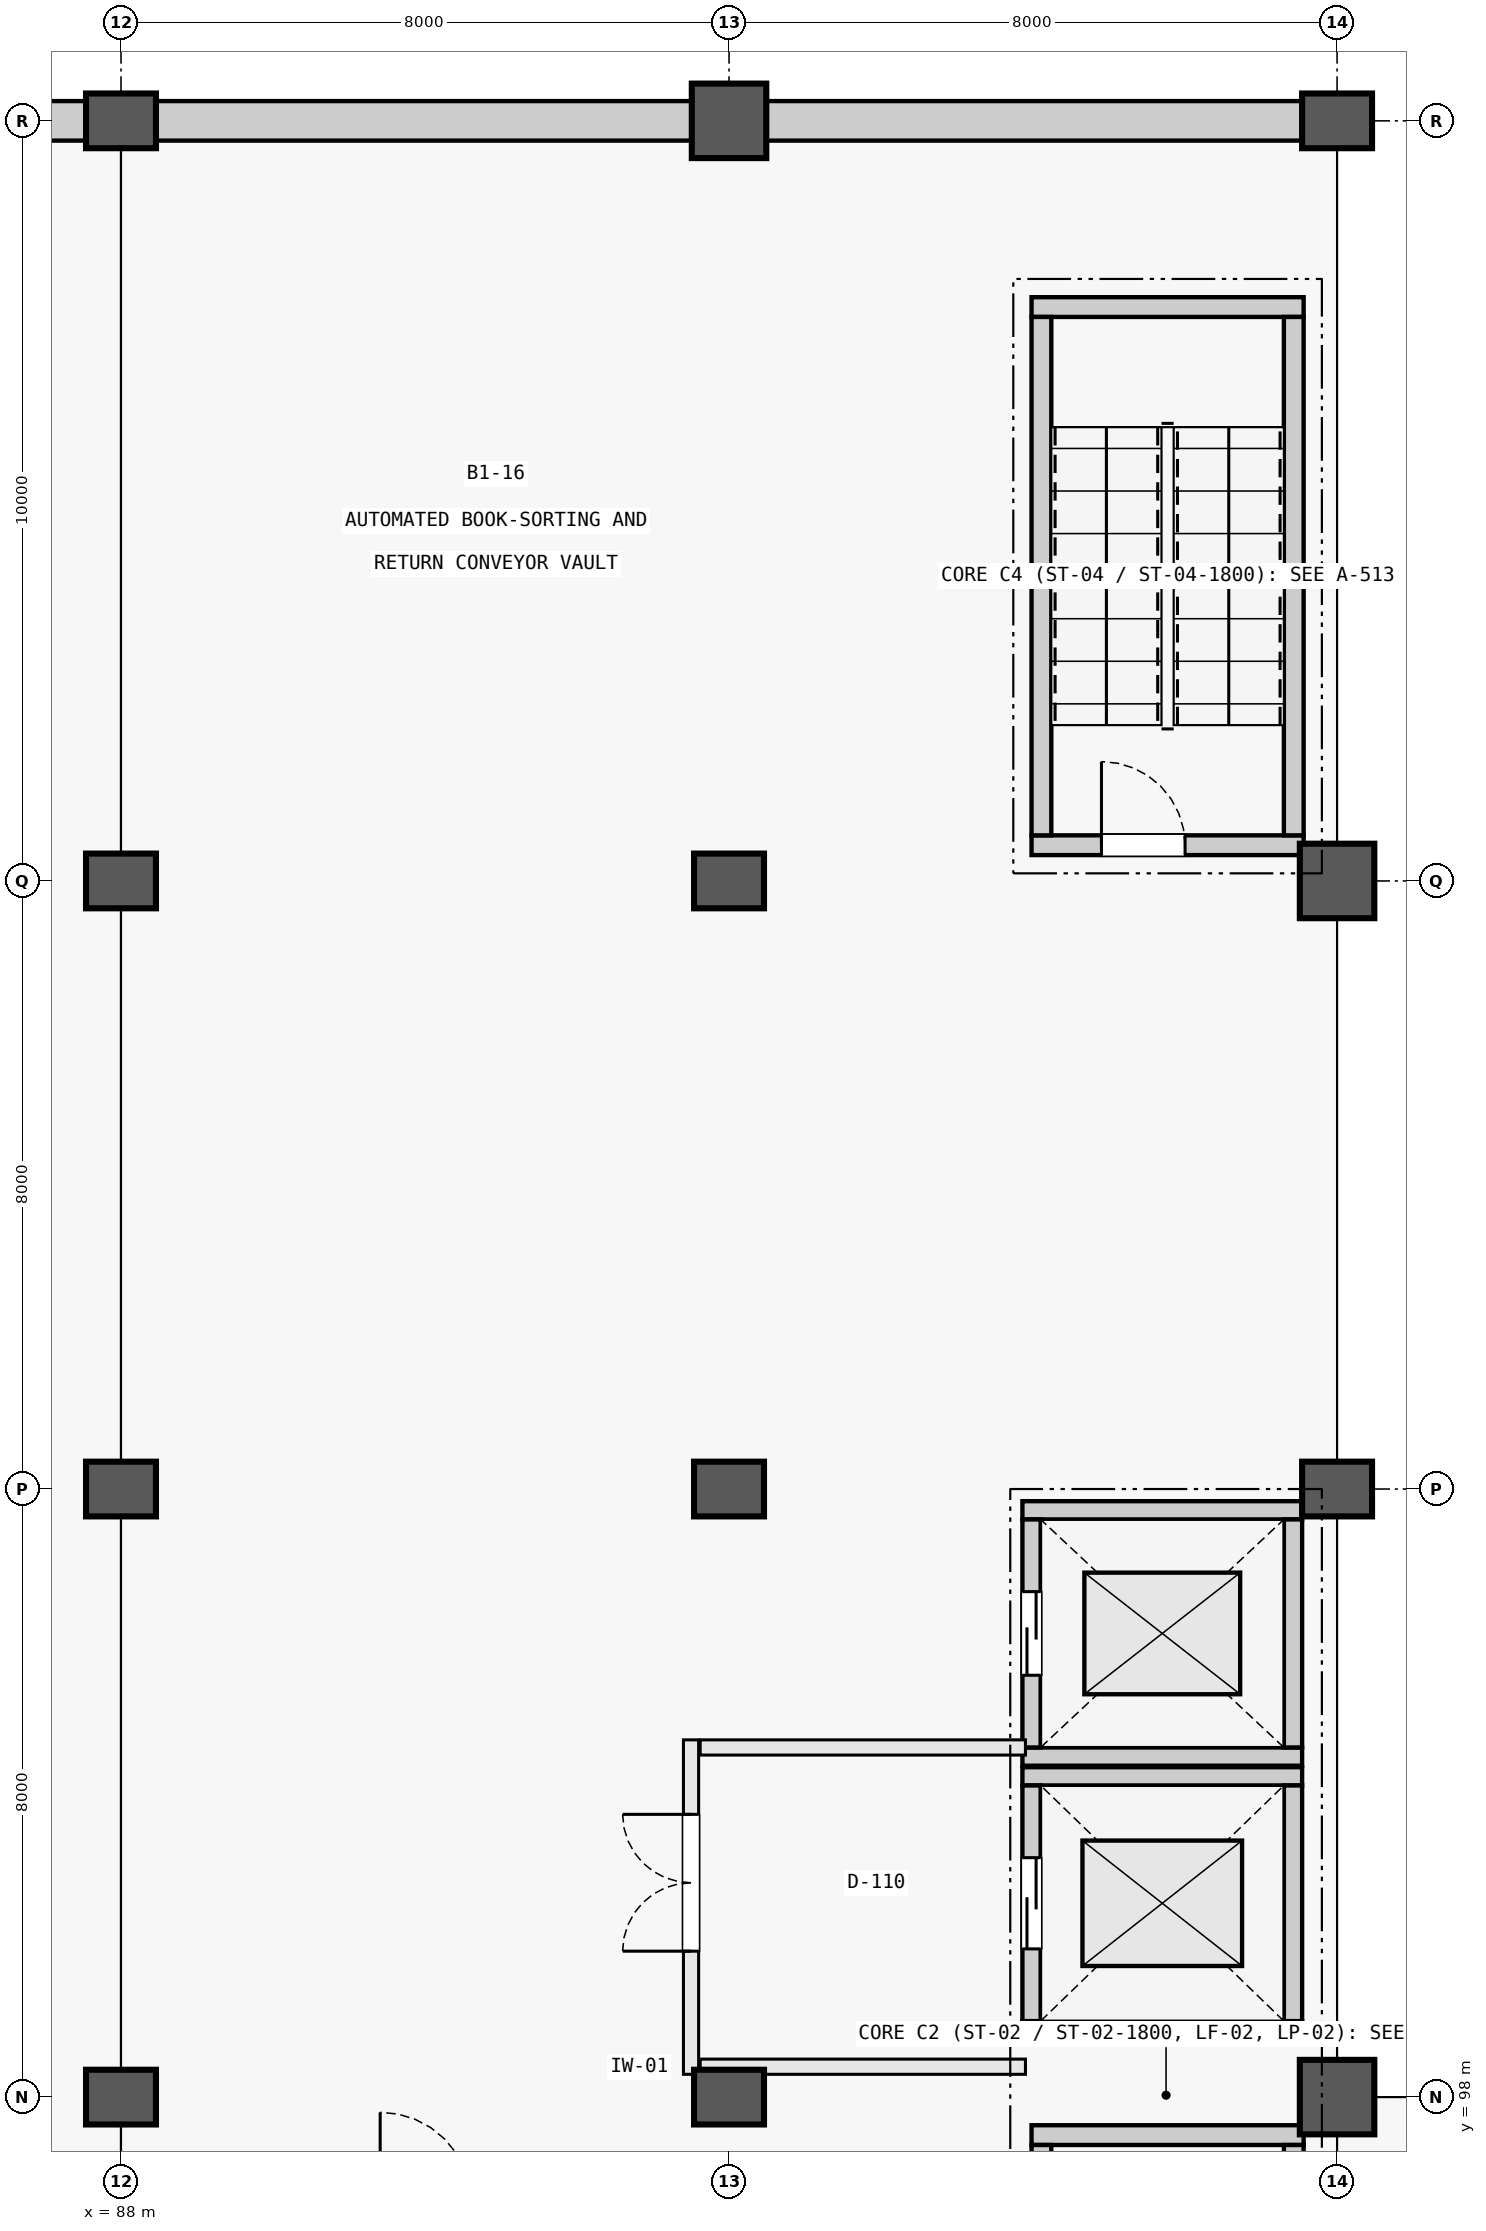
"""IFC4 building model, lengths in metres.
Left out: names, types, materials, properties, quantities, classifications, styles, units other than length and angle.
Written with IfcOpenShell. Run it as: python <this file> out.ifc"""

import sys

from ifc_helpers import new_model, si_unit, direction, frame, frame_2d, origin, origin_2d, place, context, subcontext, project, spatial, rectangle, extrude, element, fill, save


model = new_model("IFC4")
c1 = context("Model", 3, precision=1e-05, world=origin(), true_north=direction((0.0, 1.0)))
c2 = subcontext(c1, "Body", "Model", "MODEL_VIEW")
j1 = project(units=[si_unit("LENGTHUNIT", "METRE"), si_unit("PLANEANGLEUNIT", "RADIAN")], contexts=[c1])
p1 = place(None, origin())
s1 = spatial("IfcSite", under=j1, at=p1, CompositionType="ELEMENT")
p2 = place(p1, origin())
s2 = spatial("IfcBuilding", under=s1, at=p2, CompositionType="ELEMENT")
p3 = place(p2, frame((0.0, 0.0, -5.4)))
s3 = spatial("IfcBuildingStorey", under=s2, at=p3, CompositionType="ELEMENT", Elevation=-5.4)
for number, where, z_axis, x_axis in (
    (1, (88.0, 98.0, 0.0), (0.0, 0.0, 1.0), (1.0, 0.0, 0.0)),
    (2, (88.0, 106.0, 0.0), (0.0, 0.0, 1.0), (1.0, 0.0, 0.0)),
    (3, (88.0, 114.0, 0.0), (0.0, 0.0, 1.0), (1.0, 0.0, 0.0)),
    (4, (88.0, 124.0, 0.0), (0.0, 0.0, 1.0), (1.0, 0.0, 0.0)),
    (5, (96.0, 98.0, 0.0), (0.0, 0.0, 1.0), (1.0, 0.0, 0.0)),
    (6, (96.0, 106.0, 0.0), (0.0, 0.0, 1.0), (1.0, 0.0, 0.0)),
    (7, (96.0, 114.0, 0.0), (0.0, 0.0, 1.0), (1.0, 0.0, 0.0)),
):
    element("IfcColumn", number, at=place(p3, frame(where, z_axis=z_axis, x_axis=x_axis)), inside=s3, PredefinedType="COLUMN", context=c2, shape_type="SweptSolid", body=[
        extrude(rectangle(XDim=0.92, YDim=0.72, at=origin_2d()), origin(), (0.0, 0.0, 1.0), 5.4),
    ])
for number, where, z_axis, x_axis in (
    (8, (96.0, 124.0, 0.0), (0.0, 0.0, 1.0), (1.0, 0.0, 0.0)),
    (9, (104.0, 98.0, 0.0), (0.0, 0.0, 1.0), (1.0, 0.0, 0.0)),
):
    element("IfcColumn", number, at=place(p3, frame(where, z_axis=z_axis, x_axis=x_axis)), inside=s3, PredefinedType="COLUMN", context=c2, shape_type="SweptSolid", body=[
        extrude(rectangle(XDim=0.98, YDim=0.98, at=origin_2d()), origin(), (0.0, 0.0, 1.0), 5.4),
    ])
p4 = place(p3, frame((104.0, 106.0, 0.0), z_axis=(0.0, 0.0, 1.0), x_axis=(1.0, 0.0, 0.0)))
e10 = element("IfcColumn", 10, at=p4, inside=s3, PredefinedType="COLUMN", context=c2, shape_type="SweptSolid", body=[
    extrude(rectangle(XDim=0.92, YDim=0.72, at=origin_2d()), origin(), (0.0, 0.0, 1.0), 5.4),
])
p5 = place(p3, frame((104.0, 114.0, 0.0), z_axis=(0.0, 0.0, 1.0), x_axis=(1.0, 0.0, 0.0)))
e11 = element("IfcColumn", 11, at=p5, inside=s3, PredefinedType="COLUMN", context=c2, shape_type="SweptSolid", body=[
    extrude(rectangle(XDim=0.98, YDim=0.98, at=origin_2d()), origin(), (0.0, 0.0, 1.0), 5.4),
])
p6 = place(p3, frame((104.0, 124.0, 0.0), z_axis=(0.0, 0.0, 1.0), x_axis=(1.0, 0.0, 0.0)))
e12 = element("IfcColumn", 12, at=p6, inside=s3, PredefinedType="COLUMN", context=c2, shape_type="SweptSolid", body=[
    extrude(rectangle(XDim=0.92, YDim=0.72, at=origin_2d()), origin(), (0.0, 0.0, 1.0), 5.4),
])
for number, where, z_axis, x_axis in (
    (13, (80.49, 124.0, 0.0), (0.0, 0.0, 1.0), (1.0, 0.0, 0.0)),
    (14, (88.46, 124.0, 0.0), (0.0, 0.0, 1.0), (1.0, 0.0, 0.0)),
    (15, (96.49, 124.0, 0.0), (0.0, 0.0, 1.0), (1.0, 0.0, 0.0)),
):
    element("IfcWall", number, at=place(p3, frame(where, z_axis=z_axis, x_axis=x_axis)), inside=s3, PredefinedType="USERDEFINED", context=c2, shape_type="SweptSolid", body=[
        extrude(rectangle(XDim=7.05, YDim=0.52, at=frame_2d((3.525, 0.0))), origin(), (0.0, 0.0, 1.0), 4.98),
    ])
p7 = place(p3, frame((99.98, 97.5, 0.0), z_axis=(0.0, 0.0, 1.0), x_axis=(1.0, 0.0, 0.0)))
e16 = element("IfcWall", 16, at=p7, inside=s3, PredefinedType="SOLIDWALL", context=c2, shape_type="SweptSolid", body=[
    extrude(rectangle(XDim=3.58, YDim=0.26, at=frame_2d((1.79, 0.0))), origin(), (0.0, 0.0, 1.0), 5.4),
])
for number, where, z_axis, x_axis in (
    (17, (100.11, 90.55, 0.0), (0.0, 0.0, 1.0), (0.0, 1.0, 0.0)),
    (18, (103.43, 90.55, 0.0), (0.0, 0.0, 1.0), (0.0, 1.0, 0.0)),
):
    element("IfcWall", number, at=place(p3, frame(where, z_axis=z_axis, x_axis=x_axis)), inside=s3, PredefinedType="SOLIDWALL", context=c2, shape_type="SweptSolid", body=[
        extrude(rectangle(XDim=6.82, YDim=0.26, at=frame_2d((3.41, 0.0))), origin(), (0.0, 0.0, 1.0), 5.4),
    ])
p8 = place(p3, frame((99.98, 114.47, 0.0), z_axis=(0.0, 0.0, 1.0), x_axis=(1.0, 0.0, 0.0)))
e19 = element("IfcWall", 19, at=p8, inside=s3, PredefinedType="SOLIDWALL", context=c2, shape_type="SweptSolid", body=[
    extrude(rectangle(XDim=3.58, YDim=0.26, at=frame_2d((1.79, 0.0))), origin(), (0.0, 0.0, 1.0), 5.4),
])
p9 = place(p8, frame((0.92, 0.0, 0.0)))
e20 = element("IfcOpeningElement", 20, at=p9, cuts=e19, PredefinedType="OPENING", context=c2, shape_type="SweptSolid", body=[
    extrude(rectangle(XDim=1.1, YDim=2.2, at=frame_2d((0.55, 1.1))), frame((0.0, 0.142, 0.0), z_axis=(0.0, -1.0, 0.0), x_axis=(1.0, 0.0, 0.0)), (0.0, 0.0, 1.0), 0.284),
])
p10 = place(p3, frame((99.98, 121.55, 0.0), z_axis=(0.0, 0.0, 1.0), x_axis=(1.0, 0.0, 0.0)))
e21 = element("IfcWall", 21, at=p10, inside=s3, PredefinedType="SOLIDWALL", context=c2, shape_type="SweptSolid", body=[
    extrude(rectangle(XDim=3.58, YDim=0.26, at=frame_2d((1.79, 0.0))), origin(), (0.0, 0.0, 1.0), 5.4),
])
for number, where, z_axis, x_axis in (
    (22, (100.11, 114.6, 0.0), (0.0, 0.0, 1.0), (0.0, 1.0, 0.0)),
    (23, (103.43, 114.6, 0.0), (0.0, 0.0, 1.0), (0.0, 1.0, 0.0)),
):
    element("IfcWall", number, at=place(p3, frame(where, z_axis=z_axis, x_axis=x_axis)), inside=s3, PredefinedType="SOLIDWALL", context=c2, shape_type="SweptSolid", body=[
        extrude(rectangle(XDim=6.82, YDim=0.26, at=frame_2d((3.41, 0.0))), origin(), (0.0, 0.0, 1.0), 5.4),
    ])
for number, where, z_axis, x_axis in (
    (24, (99.86, 98.88, 0.0), (0.0, 0.0, 1.0), (1.0, 0.0, 0.0)),
    (25, (99.86, 102.22, 0.0), (0.0, 0.0, 1.0), (1.0, 0.0, 0.0)),
):
    element("IfcWall", number, at=place(p3, frame(where, z_axis=z_axis, x_axis=x_axis)), inside=s3, PredefinedType="SOLIDWALL", context=c2, shape_type="SweptSolid", body=[
        extrude(rectangle(XDim=3.68, YDim=0.24, at=frame_2d((1.84, 0.0))), origin(), (0.0, 0.0, 1.0), 5.4),
    ])
p11 = place(p3, frame((99.98, 99.0, 0.0), z_axis=(0.0, 0.0, 1.0), x_axis=(0.0, 1.0, 0.0)))
e26 = element("IfcWall", 26, at=p11, inside=s3, PredefinedType="SOLIDWALL", context=c2, shape_type="SweptSolid", body=[
    extrude(rectangle(XDim=3.1, YDim=0.24, at=frame_2d((1.55, 0.0))), origin(), (0.0, 0.0, 1.0), 5.4),
])
p12 = place(p11, frame((0.95, 0.0, 0.0)))
e27 = element("IfcOpeningElement", 27, at=p12, cuts=e26, PredefinedType="OPENING", context=c2, shape_type="SweptSolid", body=[
    extrude(rectangle(XDim=1.2, YDim=2.2, at=frame_2d((0.6, 1.1))), frame((0.0, 0.132, 0.0), z_axis=(0.0, -1.0, 0.0), x_axis=(1.0, 0.0, 0.0)), (0.0, 0.0, 1.0), 0.264),
])
p13 = place(p3, frame((103.42, 99.0, 0.0), z_axis=(0.0, 0.0, 1.0), x_axis=(0.0, 1.0, 0.0)))
e28 = element("IfcWall", 28, at=p13, inside=s3, PredefinedType="SOLIDWALL", context=c2, shape_type="SweptSolid", body=[
    extrude(rectangle(XDim=3.1, YDim=0.24, at=frame_2d((1.55, 0.0))), origin(), (0.0, 0.0, 1.0), 5.4),
])
for number, where, z_axis, x_axis in (
    (29, (99.86, 102.48, 0.0), (0.0, 0.0, 1.0), (1.0, 0.0, 0.0)),
    (30, (99.86, 105.72, 0.0), (0.0, 0.0, 1.0), (1.0, 0.0, 0.0)),
):
    element("IfcWall", number, at=place(p3, frame(where, z_axis=z_axis, x_axis=x_axis)), inside=s3, PredefinedType="SOLIDWALL", context=c2, shape_type="SweptSolid", body=[
        extrude(rectangle(XDim=3.68, YDim=0.24, at=frame_2d((1.84, 0.0))), origin(), (0.0, 0.0, 1.0), 5.4),
    ])
p14 = place(p3, frame((99.98, 102.6, 0.0), z_axis=(0.0, 0.0, 1.0), x_axis=(0.0, 1.0, 0.0)))
e31 = element("IfcWall", 31, at=p14, inside=s3, PredefinedType="SOLIDWALL", context=c2, shape_type="SweptSolid", body=[
    extrude(rectangle(XDim=3.0, YDim=0.24, at=frame_2d((1.5, 0.0))), origin(), (0.0, 0.0, 1.0), 5.4),
])
p15 = place(p14, frame((0.95, 0.0, 0.0)))
e32 = element("IfcOpeningElement", 32, at=p15, cuts=e31, PredefinedType="OPENING", context=c2, shape_type="SweptSolid", body=[
    extrude(rectangle(XDim=1.1, YDim=2.2, at=frame_2d((0.55, 1.1))), frame((0.0, 0.132, 0.0), z_axis=(0.0, -1.0, 0.0), x_axis=(1.0, 0.0, 0.0)), (0.0, 0.0, 1.0), 0.264),
])
p16 = place(p3, frame((103.42, 102.6, 0.0), z_axis=(0.0, 0.0, 1.0), x_axis=(0.0, 1.0, 0.0)))
e33 = element("IfcWall", 33, at=p16, inside=s3, PredefinedType="SOLIDWALL", context=c2, shape_type="SweptSolid", body=[
    extrude(rectangle(XDim=3.0, YDim=0.24, at=frame_2d((1.5, 0.0))), origin(), (0.0, 0.0, 1.0), 5.4),
])
for number, where, z_axis, x_axis in (
    (34, (95.62, 98.4, 0.0), (0.0, 0.0, 1.0), (1.0, 0.0, 0.0)),
    (35, (95.62, 102.6, 0.0), (0.0, 0.0, 1.0), (1.0, 0.0, 0.0)),
):
    element("IfcWall", number, at=place(p3, frame(where, z_axis=z_axis, x_axis=x_axis)), inside=s3, PredefinedType="PARTITIONING", context=c2, shape_type="SweptSolid", body=[
        extrude(rectangle(XDim=4.28, YDim=0.2, at=frame_2d((2.14, 0.0))), origin(), (0.0, 0.0, 1.0), 4.0),
    ])
p17 = place(p3, frame((95.5, 98.3, 0.0), z_axis=(0.0, 0.0, 1.0), x_axis=(0.0, 1.0, 0.0)))
e36 = element("IfcWall", 36, at=p17, inside=s3, PredefinedType="PARTITIONING", context=c2, shape_type="SweptSolid", body=[
    extrude(rectangle(XDim=4.4, YDim=0.2, at=frame_2d((2.2, 0.0))), origin(), (0.0, 0.0, 1.0), 4.0),
])
p18 = place(p17, frame((1.62, 0.0, 0.0)))
e37 = element("IfcOpeningElement", 37, at=p18, cuts=e36, PredefinedType="OPENING", context=c2, shape_type="SweptSolid", body=[
    extrude(rectangle(XDim=1.8, YDim=2.25, at=frame_2d((0.9, 1.125))), frame((0.0, 0.112, 0.0), z_axis=(0.0, -1.0, 0.0), x_axis=(1.0, 0.0, 0.0)), (0.0, 0.0, 1.0), 0.224),
])
p19 = place(p9, origin())
e38 = element("IfcDoor", 38, at=p19, inside=s3, OperationType="SINGLE_SWING_LEFT", PredefinedType="DOOR", context=c2, shape_type="SweptSolid", body=[
    extrude(rectangle(XDim=1.1, YDim=2.2, at=frame_2d((0.55, 1.1))), frame((0.0, 0.025, 0.0), z_axis=(0.0, -1.0, 0.0), x_axis=(1.0, 0.0, 0.0)), (0.0, 0.0, 1.0), 0.05),
])
fill(e20, e38)
p20 = place(p12, origin())
e39 = element("IfcDoor", 39, at=p20, inside=s3, OperationType="DOUBLE_DOOR_SLIDING", PredefinedType="DOOR", context=c2, shape_type="SweptSolid", body=[
    extrude(rectangle(XDim=1.2, YDim=2.2, at=frame_2d((0.6, 1.1))), frame((0.0, 0.025, 0.0), z_axis=(0.0, -1.0, 0.0), x_axis=(1.0, 0.0, 0.0)), (0.0, 0.0, 1.0), 0.05),
])
fill(e27, e39)
p21 = place(p15, origin())
e40 = element("IfcDoor", 40, at=p21, inside=s3, OperationType="DOUBLE_DOOR_SLIDING", PredefinedType="DOOR", context=c2, shape_type="SweptSolid", body=[
    extrude(rectangle(XDim=1.1, YDim=2.2, at=frame_2d((0.55, 1.1))), frame((0.0, 0.025, 0.0), z_axis=(0.0, -1.0, 0.0), x_axis=(1.0, 0.0, 0.0)), (0.0, 0.0, 1.0), 0.05),
])
fill(e32, e40)
p22 = place(p18, origin())
e41 = element("IfcDoor", 41, at=p22, inside=s3, OperationType="DOUBLE_DOOR_SINGLE_SWING", PredefinedType="DOOR", context=c2, shape_type="SweptSolid", body=[
    extrude(rectangle(XDim=1.8, YDim=2.25, at=frame_2d((0.9, 1.125))), frame((0.0, 0.025, 0.0), z_axis=(0.0, -1.0, 0.0), x_axis=(1.0, 0.0, 0.0)), (0.0, 0.0, 1.0), 0.05),
])
fill(e37, e41)
save(model, sys.argv[1])
